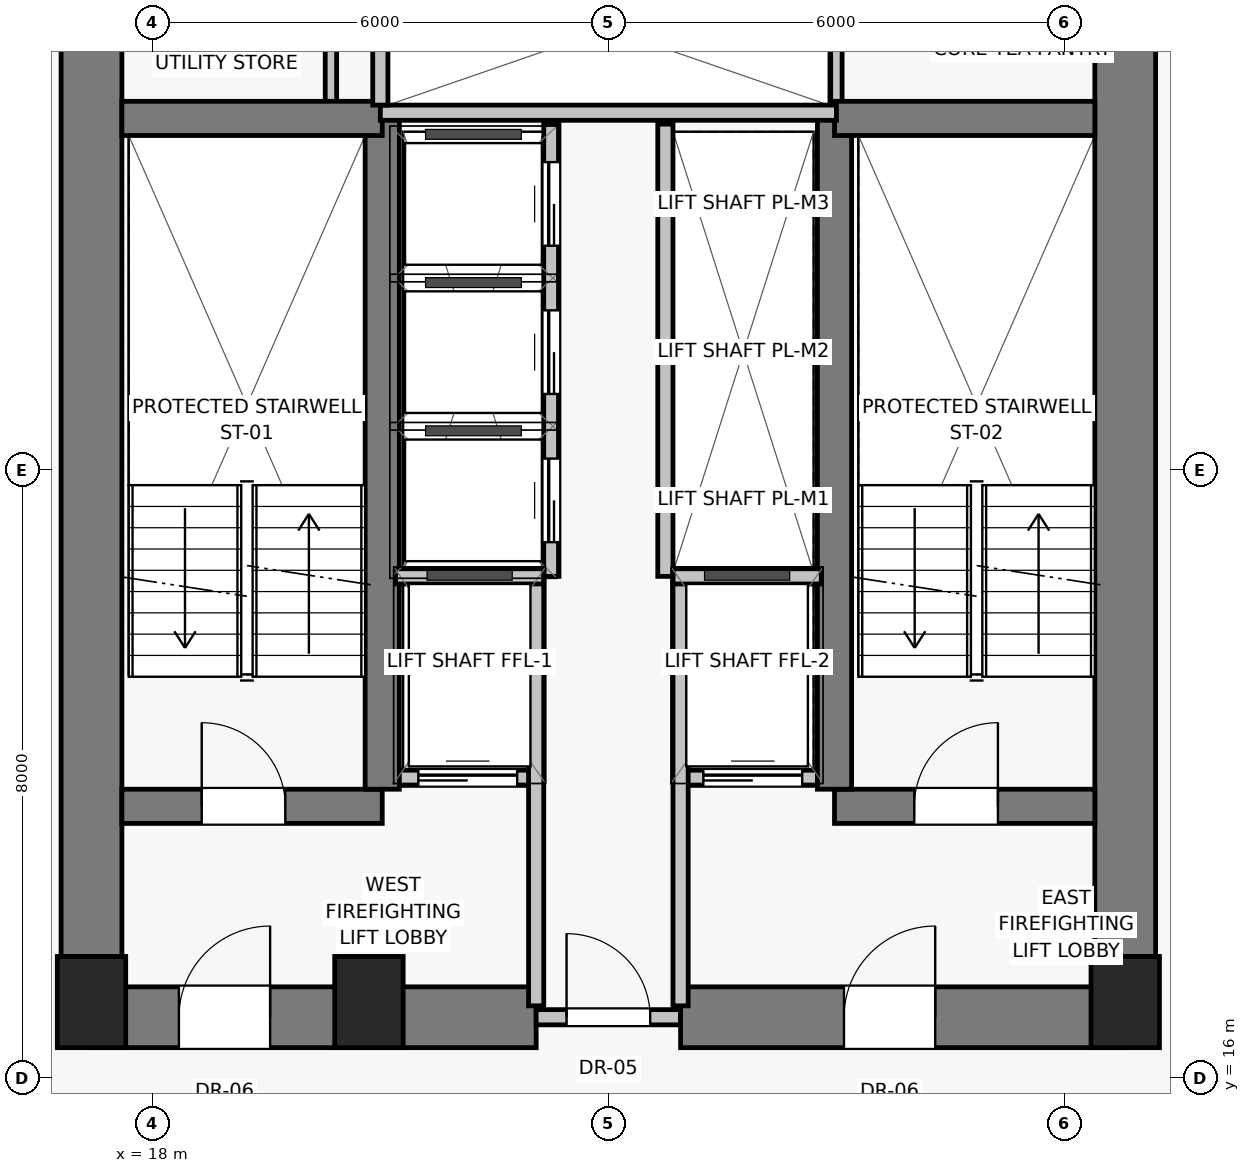
"""IFC4 building model, lengths in metres.
Left out: names, types, materials, properties, quantities, classifications, styles, units other than length and angle.
Written with IfcOpenShell. Run it as: python <this file> out.ifc"""

import sys

from ifc_helpers import new_model, si_unit, direction, frame, frame_2d, origin, origin_2d, place, context, subcontext, project, spatial, rectangle, extrude, source, transform, mapped, element, fill, save


model = new_model("IFC4")
c1 = context("Model", 3, precision=1e-05, world=origin(), true_north=direction((0.0, 1.0)))
c2 = subcontext(c1, "Body", "Model", "MODEL_VIEW")
j1 = project(units=[si_unit("LENGTHUNIT", "METRE"), si_unit("PLANEANGLEUNIT", "RADIAN")], contexts=[c1])
p1 = place(None, origin())
s1 = spatial("IfcSite", under=j1, at=p1, CompositionType="ELEMENT")
p2 = place(p1, origin())
s2 = spatial("IfcBuilding", under=s1, at=p2, CompositionType="ELEMENT")
p3 = place(p2, frame((0.0, 0.0, 33.8)))
s3 = spatial("IfcBuildingStorey", under=s2, at=p3, CompositionType="ELEMENT", Elevation=33.8)
for number, where, z_axis, x_axis in (
    (1, (17.2, 17.0, 0.0), (0.0, 0.0, 1.0), (1.0, 0.0, 0.0)),
    (2, (20.85, 17.0, 0.0), (0.0, 0.0, 1.0), (1.0, 0.0, 0.0)),
    (3, (30.8, 17.0, 0.0), (0.0, 0.0, 1.0), (1.0, 0.0, 0.0)),
):
    element("IfcColumn", number, at=place(p3, frame(where, z_axis=z_axis, x_axis=x_axis)), inside=s3, PredefinedType="PILASTER", context=c2, shape_type="SweptSolid", body=[
        extrude(rectangle(XDim=0.9, YDim=1.2, at=origin_2d()), origin(), (0.0, 0.0, 1.0), 3.25),
    ])
for number, where, z_axis, x_axis in (
    (4, (17.2, 16.8, 0.0), (0.0, 0.0, 1.0), (0.0, 1.0, 0.0)),
    (5, (30.8, 16.8, 0.0), (0.0, 0.0, 1.0), (0.0, 1.0, 0.0)),
):
    element("IfcWall", number, at=place(p3, frame(where, z_axis=z_axis, x_axis=x_axis)), inside=s3, PredefinedType="SHEAR", context=c2, shape_type="SweptSolid", body=[
        extrude(rectangle(XDim=14.2, YDim=0.8, at=frame_2d((7.1, 0.0))), origin(), (0.0, 0.0, 1.0), 3.0),
    ])
p4 = place(p3, frame((17.2, 16.8, 0.0), z_axis=(0.0, 0.0, 1.0), x_axis=(1.0, 0.0, 0.0)))
e6 = element("IfcWall", 6, at=p4, inside=s3, PredefinedType="SHEAR", context=c2, shape_type="SweptSolid", body=[
    extrude(rectangle(XDim=5.85, YDim=0.8, at=frame_2d((2.925, 0.0))), origin(), (0.0, 0.0, 1.0), 3.0),
])
p5 = place(p4, frame((1.15, 0.0, 0.0)))
e7 = element("IfcOpeningElement", 7, at=p5, cuts=e6, PredefinedType="OPENING", context=c2, shape_type="SweptSolid", body=[
    extrude(rectangle(XDim=1.2, YDim=2.03, at=frame_2d((0.6, 1.015))), frame((0.0, 0.41, 0.0), z_axis=(0.0, -1.0, 0.0), x_axis=(1.0, 0.0, 0.0)), (0.0, 0.0, 1.0), 0.82),
])
p6 = place(p3, frame((23.05, 16.8, 0.0), z_axis=(0.0, 0.0, 1.0), x_axis=(1.0, 0.0, 0.0)))
e8 = element("IfcWall", 8, at=p6, inside=s3, PredefinedType="SOLIDWALL", context=c2, shape_type="SweptSolid", body=[
    extrude(rectangle(XDim=1.9, YDim=0.2, at=frame_2d((0.95, 0.0))), origin(), (0.0, 0.0, 1.0), 2.15),
])
p7 = place(p6, frame((0.4, 0.0, 0.0)))
e9 = element("IfcOpeningElement", 9, at=p7, cuts=e8, PredefinedType="OPENING", context=c2, shape_type="SweptSolid", body=[
    extrude(rectangle(XDim=1.1, YDim=2.03, at=frame_2d((0.55, 1.015))), frame((0.0, 0.11, 0.0), z_axis=(0.0, -1.0, 0.0), x_axis=(1.0, 0.0, 0.0)), (0.0, 0.0, 1.0), 0.22),
])
p8 = place(p3, frame((24.95, 16.8, 0.0), z_axis=(0.0, 0.0, 1.0), x_axis=(1.0, 0.0, 0.0)))
e10 = element("IfcWall", 10, at=p8, inside=s3, PredefinedType="SHEAR", context=c2, shape_type="SweptSolid", body=[
    extrude(rectangle(XDim=5.85, YDim=0.8, at=frame_2d((2.925, 0.0))), origin(), (0.0, 0.0, 1.0), 3.0),
])
p9 = place(p8, frame((2.15, 0.0, 0.0)))
e11 = element("IfcOpeningElement", 11, at=p9, cuts=e10, PredefinedType="OPENING", context=c2, shape_type="SweptSolid", body=[
    extrude(rectangle(XDim=1.2, YDim=2.03, at=frame_2d((0.6, 1.015))), frame((0.0, 0.41, 0.0), z_axis=(0.0, -1.0, 0.0), x_axis=(1.0, 0.0, 0.0)), (0.0, 0.0, 1.0), 0.82),
])
for number, where, z_axis, x_axis in (
    (12, (20.35, 28.65, 0.0), (0.0, 0.0, 1.0), (0.0, 1.0, 0.0)),
    (13, (27.0, 28.65, 0.0), (0.0, 0.0, 1.0), (0.0, 1.0, 0.0)),
):
    element("IfcWall", number, at=place(p3, frame(where, z_axis=z_axis, x_axis=x_axis)), inside=s3, PredefinedType="PARTITIONING", context=c2, shape_type="SweptSolid", body=[
        extrude(rectangle(XDim=2.2, YDim=0.15, at=frame_2d((1.1, 0.0))), origin(), (0.0, 0.0, 1.0), 3.0),
    ])
p10 = place(p3, frame((17.6, 19.575, 0.0), z_axis=(0.0, 0.0, 1.0), x_axis=(1.0, 0.0, 0.0)))
e14 = element("IfcWall", 14, at=p10, inside=s3, PredefinedType="SHEAR", context=c2, shape_type="SweptSolid", body=[
    extrude(rectangle(XDim=3.425, YDim=0.45, at=frame_2d((1.712, 0.0))), origin(), (0.0, 0.0, 1.0), 3.0),
])
p11 = place(p10, frame((1.05, 0.0, 0.0)))
e15 = element("IfcOpeningElement", 15, at=p11, cuts=e14, PredefinedType="OPENING", context=c2, shape_type="SweptSolid", body=[
    extrude(rectangle(XDim=1.1, YDim=2.03, at=frame_2d((0.55, 1.015))), frame((0.0, 0.235, 0.0), z_axis=(0.0, -1.0, 0.0), x_axis=(1.0, 0.0, 0.0)), (0.0, 0.0, 1.0), 0.47),
])
p12 = place(p3, frame((21.2, 19.95, 0.0), z_axis=(0.0, 0.0, 1.0), x_axis=(1.0, 0.0, 0.0)))
e16 = element("IfcWall", 16, at=p12, inside=s3, PredefinedType="SOLIDWALL", context=c2, shape_type="SweptSolid", body=[
    extrude(rectangle(XDim=1.85, YDim=0.2, at=frame_2d((0.925, 0.0))), origin(), (0.0, 0.0, 1.0), 3.0),
])
p13 = place(p12, frame((0.3, 0.0, 0.0)))
e17 = element("IfcOpeningElement", 17, at=p13, cuts=e16, PredefinedType="OPENING", context=c2, shape_type="SweptSolid", body=[
    extrude(rectangle(XDim=1.3, YDim=2.25, at=frame_2d((0.65, 1.125))), frame((0.0, 0.11, 0.0), z_axis=(0.0, -1.0, 0.0), x_axis=(1.0, 0.0, 0.0)), (0.0, 0.0, 1.0), 0.22),
])
p14 = place(p3, frame((24.95, 19.95, 0.0), z_axis=(0.0, 0.0, 1.0), x_axis=(1.0, 0.0, 0.0)))
e18 = element("IfcWall", 18, at=p14, inside=s3, PredefinedType="SOLIDWALL", context=c2, shape_type="SweptSolid", body=[
    extrude(rectangle(XDim=1.85, YDim=0.2, at=frame_2d((0.925, 0.0))), origin(), (0.0, 0.0, 1.0), 3.0),
])
p15 = place(p14, frame((0.3, 0.0, 0.0)))
e19 = element("IfcOpeningElement", 19, at=p15, cuts=e18, PredefinedType="OPENING", context=c2, shape_type="SweptSolid", body=[
    extrude(rectangle(XDim=1.3, YDim=2.25, at=frame_2d((0.65, 1.125))), frame((0.0, 0.11, 0.0), z_axis=(0.0, -1.0, 0.0), x_axis=(1.0, 0.0, 0.0)), (0.0, 0.0, 1.0), 0.22),
])
p16 = place(p3, frame((26.975, 19.575, 0.0), z_axis=(0.0, 0.0, 1.0), x_axis=(1.0, 0.0, 0.0)))
e20 = element("IfcWall", 20, at=p16, inside=s3, PredefinedType="SHEAR", context=c2, shape_type="SweptSolid", body=[
    extrude(rectangle(XDim=3.425, YDim=0.45, at=frame_2d((1.712, 0.0))), origin(), (0.0, 0.0, 1.0), 3.0),
])
p17 = place(p16, frame((1.05, 0.0, 0.0)))
e21 = element("IfcOpeningElement", 21, at=p17, cuts=e20, PredefinedType="OPENING", context=c2, shape_type="SweptSolid", body=[
    extrude(rectangle(XDim=1.1, YDim=2.03, at=frame_2d((0.55, 1.015))), frame((0.0, 0.235, 0.0), z_axis=(0.0, -1.0, 0.0), x_axis=(1.0, 0.0, 0.0)), (0.0, 0.0, 1.0), 0.47),
])
for number, where, z_axis, x_axis in (
    (22, (21.025, 19.8, 0.0), (0.0, 0.0, 1.0), (0.0, 1.0, 0.0)),
    (23, (26.975, 19.8, 0.0), (0.0, 0.0, 1.0), (0.0, 1.0, 0.0)),
):
    element("IfcWall", number, at=place(p3, frame(where, z_axis=z_axis, x_axis=x_axis)), inside=s3, PredefinedType="SHEAR", context=c2, shape_type="SweptSolid", body=[
        extrude(rectangle(XDim=8.825, YDim=0.45, at=frame_2d((4.413, 0.0))), origin(), (0.0, 0.0, 1.0), 3.0),
    ])
for number, where, z_axis, x_axis in (
    (24, (17.6, 28.625, 0.0), (0.0, 0.0, 1.0), (1.0, 0.0, 0.0)),
    (25, (26.975, 28.625, 0.0), (0.0, 0.0, 1.0), (1.0, 0.0, 0.0)),
):
    element("IfcWall", number, at=place(p3, frame(where, z_axis=z_axis, x_axis=x_axis)), inside=s3, PredefinedType="SHEAR", context=c2, shape_type="SweptSolid", body=[
        extrude(rectangle(XDim=3.425, YDim=0.45, at=frame_2d((1.712, 0.0))), origin(), (0.0, 0.0, 1.0), 3.0),
    ])
for number, where, z_axis, x_axis in (
    (26, (23.05, 16.95, 0.0), (0.0, 0.0, 1.0), (0.0, 1.0, 0.0)),
    (27, (24.95, 16.95, 0.0), (0.0, 0.0, 1.0), (0.0, 1.0, 0.0)),
):
    element("IfcWall", number, at=place(p3, frame(where, z_axis=z_axis, x_axis=x_axis)), inside=s3, PredefinedType="SOLIDWALL", context=c2, shape_type="SweptSolid", body=[
        extrude(rectangle(XDim=5.6, YDim=0.2, at=frame_2d((2.8, 0.0))), origin(), (0.0, 0.0, 1.0), 3.0),
    ])
for number, where, z_axis, x_axis in (
    (28, (21.2, 22.6, 0.0), (0.0, 0.0, 1.0), (1.0, 0.0, 0.0)),
    (29, (24.85, 22.6, 0.0), (0.0, 0.0, 1.0), (1.0, 0.0, 0.0)),
):
    element("IfcWall", number, at=place(p3, frame(where, z_axis=z_axis, x_axis=x_axis)), inside=s3, PredefinedType="SOLIDWALL", context=c2, shape_type="SweptSolid", body=[
        extrude(rectangle(XDim=1.95, YDim=0.2, at=frame_2d((0.975, 0.0))), origin(), (0.0, 0.0, 1.0), 3.0),
    ])
p18 = place(p3, frame((21.0, 28.7, 0.0), z_axis=(0.0, 0.0, 1.0), x_axis=(1.0, 0.0, 0.0)))
e30 = element("IfcWall", 30, at=p18, inside=s3, PredefinedType="SOLIDWALL", context=c2, shape_type="SweptSolid", body=[
    extrude(rectangle(XDim=6.0, YDim=0.2, at=frame_2d((3.0, 0.0))), origin(), (0.0, 0.0, 1.0), 3.0),
])
p19 = place(p3, frame((21.0, 28.8, 0.0), z_axis=(0.0, 0.0, 1.0), x_axis=(0.0, 1.0, 0.0)))
e31 = element("IfcWall", 31, at=p19, inside=s3, PredefinedType="SOLIDWALL", context=c2, shape_type="SweptSolid", body=[
    extrude(rectangle(XDim=1.6, YDim=0.2, at=frame_2d((0.8, 0.0))), origin(), (0.0, 0.0, 1.0), 3.0),
])
p20 = place(p3, frame((23.25, 22.6, 0.0), z_axis=(0.0, 0.0, 1.0), x_axis=(0.0, 1.0, 0.0)))
e32 = element("IfcWall", 32, at=p20, inside=s3, PredefinedType="SOLIDWALL", context=c2, shape_type="SweptSolid", body=[
    extrude(rectangle(XDim=5.95, YDim=0.2, at=frame_2d((2.975, 0.0))), origin(), (0.0, 0.0, 1.0), 3.0),
])
p21 = place(p20, frame((0.45, 0.0, 0.0)))
e33 = element("IfcOpeningElement", 33, at=p21, cuts=e32, PredefinedType="OPENING", context=c2, shape_type="SweptSolid", body=[
    extrude(rectangle(XDim=1.1, YDim=2.08, at=frame_2d((0.55, 1.04))), frame((0.0, 0.11, 0.0), z_axis=(0.0, -1.0, 0.0), x_axis=(1.0, 0.0, 0.0)), (0.0, 0.0, 1.0), 0.22),
])
p22 = place(p20, frame((2.4, 0.0, 0.0)))
e34 = element("IfcOpeningElement", 34, at=p22, cuts=e32, PredefinedType="OPENING", context=c2, shape_type="SweptSolid", body=[
    extrude(rectangle(XDim=1.1, YDim=2.08, at=frame_2d((0.55, 1.04))), frame((0.0, 0.11, 0.0), z_axis=(0.0, -1.0, 0.0), x_axis=(1.0, 0.0, 0.0)), (0.0, 0.0, 1.0), 0.22),
])
p23 = place(p20, frame((4.35, 0.0, 0.0)))
e35 = element("IfcOpeningElement", 35, at=p23, cuts=e32, PredefinedType="OPENING", context=c2, shape_type="SweptSolid", body=[
    extrude(rectangle(XDim=1.1, YDim=2.08, at=frame_2d((0.55, 1.04))), frame((0.0, 0.11, 0.0), z_axis=(0.0, -1.0, 0.0), x_axis=(1.0, 0.0, 0.0)), (0.0, 0.0, 1.0), 0.22),
])
p24 = place(p3, frame((24.75, 22.6, 0.0), z_axis=(0.0, 0.0, 1.0), x_axis=(0.0, 1.0, 0.0)))
e36 = element("IfcWall", 36, at=p24, inside=s3, PredefinedType="SOLIDWALL", context=c2, shape_type="SweptSolid", body=[
    extrude(rectangle(XDim=5.95, YDim=0.2, at=frame_2d((2.975, 0.0))), origin(), (0.0, 0.0, 1.0), 3.0),
])
m1 = source(origin(), c2, "Body", "SweptSolid", [
    extrude(rectangle(XDim=1.2, YDim=2.03, at=frame_2d((0.6, 1.015))), frame((0.0, 0.025, 0.0), z_axis=(0.0, -1.0, 0.0), x_axis=(1.0, 0.0, 0.0)), (0.0, 0.0, 1.0), 0.05),
])
p25 = place(p5, origin())
e37 = element("IfcDoor", 37, at=p25, inside=s3, OperationType="SINGLE_SWING_RIGHT", PredefinedType="DOOR", context=c2, shape_type="MappedRepresentation", body=[
    mapped(m1, transform((0.0, 0.0, 0.0), scale=1.0)),
])
fill(e7, e37)
m2 = source(origin(), c2, "Body", "SweptSolid", [
    extrude(rectangle(XDim=1.1, YDim=2.03, at=frame_2d((0.55, 1.015))), frame((0.0, 0.025, 0.0), z_axis=(0.0, -1.0, 0.0), x_axis=(1.0, 0.0, 0.0)), (0.0, 0.0, 1.0), 0.05),
])
p26 = place(p7, origin())
e38 = element("IfcDoor", 38, at=p26, inside=s3, OperationType="SINGLE_SWING_LEFT", PredefinedType="DOOR", context=c2, shape_type="MappedRepresentation", body=[
    mapped(m2, transform((0.0, 0.0, 0.0), scale=1.0)),
])
fill(e9, e38)
p27 = place(p9, origin())
e39 = element("IfcDoor", 39, at=p27, inside=s3, OperationType="SINGLE_SWING_RIGHT", PredefinedType="DOOR", context=c2, shape_type="MappedRepresentation", body=[
    mapped(m1, transform((0.0, 0.0, 0.0), scale=1.0)),
])
fill(e11, e39)
p28 = place(p11, origin())
e40 = element("IfcDoor", 40, at=p28, inside=s3, OperationType="SINGLE_SWING_LEFT", PredefinedType="DOOR", context=c2, shape_type="MappedRepresentation", body=[
    mapped(m2, transform((0.0, 0.0, 0.0), scale=1.0)),
])
fill(e15, e40)
m3 = source(origin(), c2, "Body", "SweptSolid", [
    extrude(rectangle(XDim=1.3, YDim=2.25, at=frame_2d((0.65, 1.125))), frame((0.0, 0.025, 0.0), z_axis=(0.0, -1.0, 0.0), x_axis=(1.0, 0.0, 0.0)), (0.0, 0.0, 1.0), 0.05),
])
p29 = place(p13, origin())
e41 = element("IfcDoor", 41, at=p29, inside=s3, OperationType="SLIDING_TO_LEFT", PredefinedType="DOOR", context=c2, shape_type="MappedRepresentation", body=[
    mapped(m3, transform((0.0, 0.0, 0.0), scale=1.0)),
])
fill(e17, e41)
p30 = place(p15, origin())
e42 = element("IfcDoor", 42, at=p30, inside=s3, OperationType="SLIDING_TO_LEFT", PredefinedType="DOOR", context=c2, shape_type="MappedRepresentation", body=[
    mapped(m3, transform((0.0, 0.0, 0.0), scale=1.0)),
])
fill(e19, e42)
p31 = place(p17, origin())
e43 = element("IfcDoor", 43, at=p31, inside=s3, OperationType="SINGLE_SWING_RIGHT", PredefinedType="DOOR", context=c2, shape_type="MappedRepresentation", body=[
    mapped(m2, transform((0.0, 0.0, 0.0), scale=1.0)),
])
fill(e21, e43)
m4 = source(origin(), c2, "Body", "SweptSolid", [
    extrude(rectangle(XDim=1.1, YDim=2.08, at=frame_2d((0.55, 1.04))), frame((0.0, 0.025, 0.0), z_axis=(0.0, -1.0, 0.0), x_axis=(1.0, 0.0, 0.0)), (0.0, 0.0, 1.0), 0.05),
])
p32 = place(p21, origin())
e44 = element("IfcDoor", 44, at=p32, inside=s3, OperationType="SLIDING_TO_LEFT", PredefinedType="DOOR", context=c2, shape_type="MappedRepresentation", body=[
    mapped(m4, transform((0.0, 0.0, 0.0), scale=1.0)),
])
fill(e33, e44)
p33 = place(p22, origin())
e45 = element("IfcDoor", 45, at=p33, inside=s3, OperationType="SLIDING_TO_LEFT", PredefinedType="DOOR", context=c2, shape_type="MappedRepresentation", body=[
    mapped(m4, transform((0.0, 0.0, 0.0), scale=1.0)),
])
fill(e34, e45)
p34 = place(p23, origin())
e46 = element("IfcDoor", 46, at=p34, inside=s3, OperationType="SLIDING_TO_LEFT", PredefinedType="DOOR", context=c2, shape_type="MappedRepresentation", body=[
    mapped(m4, transform((0.0, 0.0, 0.0), scale=1.0)),
])
fill(e35, e46)
save(model, sys.argv[1])
